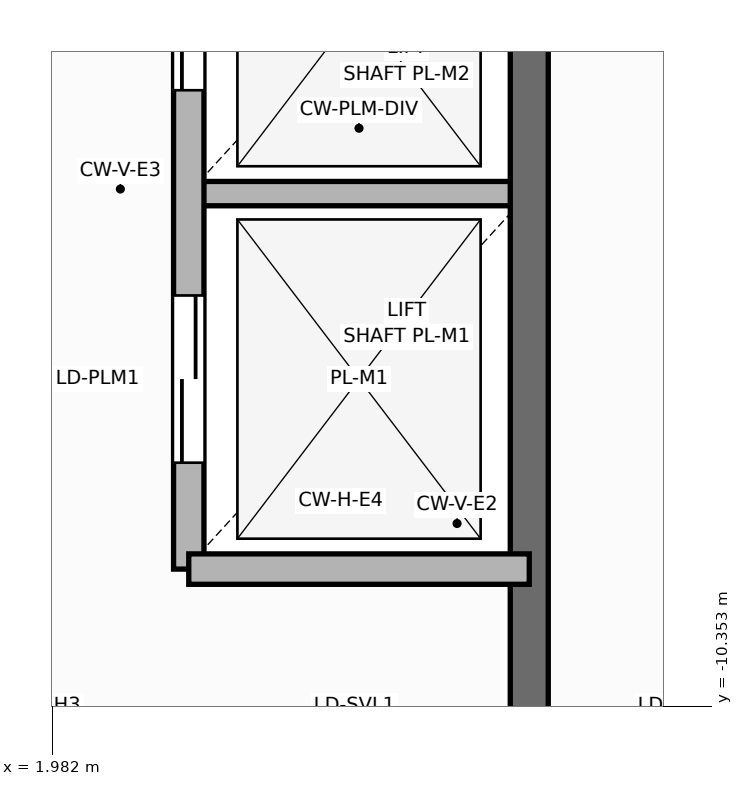
"""IFC4 building model, lengths in metres.
Left out: names, types, materials, properties, quantities, classifications, styles, units other than length and angle.
Written with IfcOpenShell. Run it as: python <this file> out.ifc"""

import sys

from ifc_helpers import new_model, si_unit, direction, frame, frame_2d, origin, place, context, subcontext, project, spatial, rectangle, extrude, element, fill, save


model = new_model("IFC4")
c1 = context("Model", 3, precision=1e-05, world=origin(), true_north=direction((0.0, 1.0)))
c2 = subcontext(c1, "Body", "Model", "MODEL_VIEW")
j1 = project(units=[si_unit("LENGTHUNIT", "METRE"), si_unit("PLANEANGLEUNIT", "RADIAN")], contexts=[c1])
p1 = place(None, origin())
s1 = spatial("IfcSite", under=j1, at=p1, CompositionType="ELEMENT")
p2 = place(p1, origin())
s2 = spatial("IfcBuilding", under=s1, at=p2, CompositionType="ELEMENT")
p3 = place(p2, frame((0.0, 0.0, 106.8)))
s3 = spatial("IfcBuildingStorey", under=s2, at=p3, CompositionType="ELEMENT", Elevation=106.8)
p4 = place(p3, frame((2.88, -6.98, 0.0), z_axis=(0.0, 0.0, 1.0), x_axis=(1.0, 0.0, 0.0)))
e1 = element("IfcWall", 1, at=p4, inside=s3, PredefinedType="PARTITIONING", context=c2, shape_type="SweptSolid", body=[
    extrude(rectangle(XDim=2.24, YDim=0.16, at=frame_2d((1.12, 0.0))), origin(), (0.0, 0.0, 1.0), 3.35),
])
p5 = place(p3, frame((5.12, -13.85, 0.0), z_axis=(0.0, 0.0, 1.0), x_axis=(0.0, 1.0, 0.0)))
e2 = element("IfcWall", 2, at=p5, inside=s3, PredefinedType="SHEAR", context=c2, shape_type="SweptSolid", body=[
    extrude(rectangle(XDim=9.4, YDim=0.25, at=frame_2d((4.7, 0.0))), origin(), (0.0, 0.0, 1.0), 3.6),
])
p6 = place(p3, frame((2.88, -9.45, 0.0), z_axis=(0.0, 0.0, 1.0), x_axis=(0.0, 1.0, 0.0)))
e3 = element("IfcWall", 3, at=p6, inside=s3, PredefinedType="SOLIDWALL", context=c2, shape_type="SweptSolid", body=[
    extrude(rectangle(XDim=5.0, YDim=0.2, at=frame_2d((2.5, 0.0))), origin(), (0.0, 0.0, 1.0), 3.35),
])
p7 = place(p6, frame((0.7, 0.0, 0.0)))
e4 = element("IfcOpeningElement", 4, at=p7, cuts=e3, PredefinedType="OPENING", context=c2, shape_type="SweptSolid", body=[
    extrude(rectangle(XDim=1.106, YDim=2.104, at=frame_2d((0.55, 1.052))), frame((0.0, 0.11, 0.0), z_axis=(0.0, -1.0, 0.0), x_axis=(1.0, 0.0, 0.0)), (0.0, 0.0, 1.0), 0.22),
])
p8 = place(p6, frame((3.15, 0.0, 0.0)))
e5 = element("IfcOpeningElement", 5, at=p8, cuts=e3, PredefinedType="OPENING", context=c2, shape_type="SweptSolid", body=[
    extrude(rectangle(XDim=1.106, YDim=2.104, at=frame_2d((0.55, 1.052))), frame((0.0, 0.11, 0.0), z_axis=(0.0, -1.0, 0.0), x_axis=(1.0, 0.0, 0.0)), (0.0, 0.0, 1.0), 0.22),
])
p9 = place(p3, frame((2.88, -9.45, 0.0), z_axis=(0.0, 0.0, 1.0), x_axis=(1.0, 0.0, 0.0)))
e6 = element("IfcWall", 6, at=p9, inside=s3, PredefinedType="SOLIDWALL", context=c2, shape_type="SweptSolid", body=[
    extrude(rectangle(XDim=2.24, YDim=0.2, at=frame_2d((1.12, 0.0))), origin(), (0.0, 0.0, 1.0), 3.35),
])
p10 = place(p7, origin())
e7 = element("IfcDoor", 7, at=p10, inside=s3, OperationType="DOUBLE_DOOR_SLIDING", PredefinedType="DOOR", context=c2, shape_type="SweptSolid", body=[
    extrude(rectangle(XDim=1.1, YDim=2.1, at=frame_2d((0.55, 1.05))), frame((0.0, 0.025, 0.0), z_axis=(0.0, -1.0, 0.0), x_axis=(1.0, 0.0, 0.0)), (0.0, 0.0, 1.0), 0.05),
])
fill(e4, e7)
p11 = place(p8, origin())
e8 = element("IfcDoor", 8, at=p11, inside=s3, OperationType="DOUBLE_DOOR_SLIDING", PredefinedType="DOOR", context=c2, shape_type="SweptSolid", body=[
    extrude(rectangle(XDim=1.1, YDim=2.1, at=frame_2d((0.55, 1.05))), frame((0.0, 0.025, 0.0), z_axis=(0.0, -1.0, 0.0), x_axis=(1.0, 0.0, 0.0)), (0.0, 0.0, 1.0), 0.05),
])
fill(e5, e8)
save(model, sys.argv[1])
